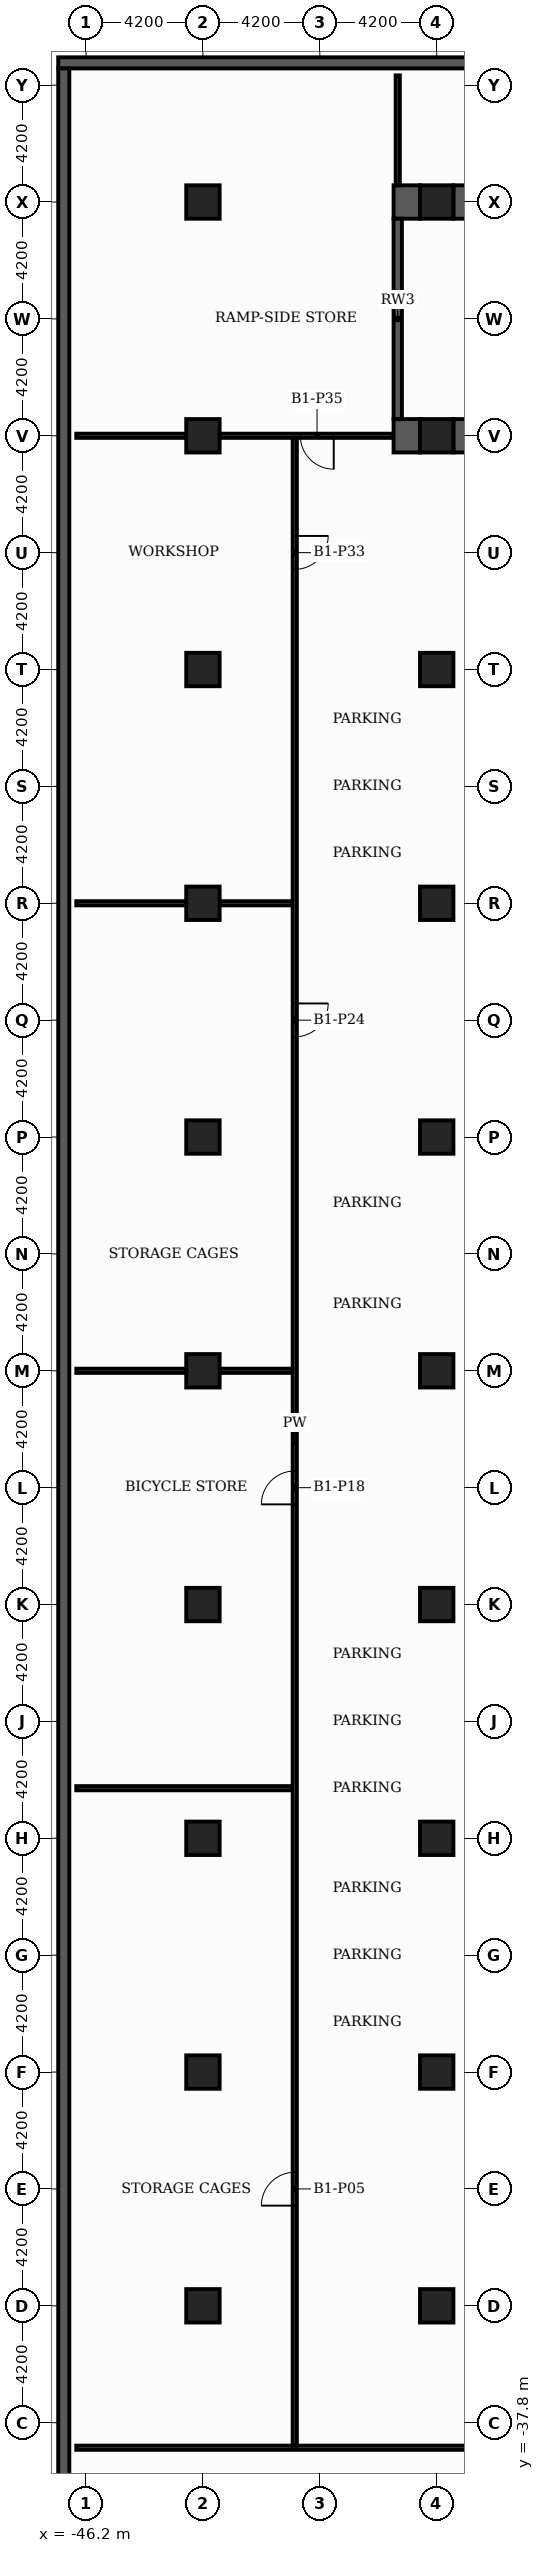
"""IFC4 building model, lengths in metres.
Left out: names, types, materials, properties, quantities, classifications, styles, units other than length and angle.
Written with IfcOpenShell. Run it as: python <this file> out.ifc"""

import sys

from ifc_helpers import new_model, si_unit, direction, frame, frame_2d, origin, origin_2d, place, context, subcontext, project, spatial, rectangle, extrude, element, fill, save


model = new_model("IFC4")
c1 = context("Model", 3, precision=1e-05, world=origin(), true_north=direction((0.0, 1.0)))
c2 = subcontext(c1, "Body", "Model", "MODEL_VIEW")
j1 = project(units=[si_unit("LENGTHUNIT", "METRE"), si_unit("PLANEANGLEUNIT", "RADIAN")], contexts=[c1])
p1 = place(None, origin())
s1 = spatial("IfcSite", under=j1, at=p1, CompositionType="ELEMENT")
p2 = place(p1, origin())
s2 = spatial("IfcBuilding", under=s1, at=p2, CompositionType="ELEMENT")
p3 = place(p2, frame((0.0, 0.0, -4.2)))
s3 = spatial("IfcBuildingStorey", under=s2, at=p3, CompositionType="ELEMENT", Elevation=-4.2)
p4 = place(p3, frame((-47.2, 47.0, 0.0), z_axis=(0.0, 0.0, 1.0), x_axis=(1.0, 0.0, 0.0)))
e1 = element("IfcWall", 1, at=p4, inside=s3, PredefinedType="USERDEFINED", context=c2, shape_type="SweptSolid", body=[
    extrude(rectangle(XDim=94.4, YDim=0.4, at=frame_2d((47.2, 0.0))), origin(), (0.0, 0.0, 1.0), 4.2),
])
p5 = place(p3, frame((-47.0, -46.8, 0.0), z_axis=(0.0, 0.0, 1.0), x_axis=(0.0, 1.0, 0.0)))
e2 = element("IfcWall", 2, at=p5, inside=s3, PredefinedType="USERDEFINED", context=c2, shape_type="SweptSolid", body=[
    extrude(rectangle(XDim=93.6, YDim=0.4, at=frame_2d((46.8, 0.0))), origin(), (0.0, 0.0, 1.0), 4.2),
])
for number, where, z_axis, x_axis in (
    (3, (-33.6, 0.0, 0.0), (0.0, 0.0, 1.0), (1.0, 0.0, 0.0)),
    (4, (-33.6, 8.4, 0.0), (0.0, 0.0, 1.0), (1.0, 0.0, 0.0)),
    (5, (-33.6, 16.8, 0.0), (0.0, 0.0, 1.0), (1.0, 0.0, 0.0)),
    (6, (-33.6, 25.2, 0.0), (0.0, 0.0, 1.0), (1.0, 0.0, 0.0)),
    (7, (-33.6, 33.6, 0.0), (0.0, 0.0, 1.0), (1.0, 0.0, 0.0)),
    (8, (-33.6, 42.0, 0.0), (0.0, 0.0, 1.0), (1.0, 0.0, 0.0)),
    (9, (-33.6, -8.4, 0.0), (0.0, 0.0, 1.0), (1.0, 0.0, 0.0)),
    (10, (-33.6, -16.8, 0.0), (0.0, 0.0, 1.0), (1.0, 0.0, 0.0)),
    (11, (-33.6, -25.2, 0.0), (0.0, 0.0, 1.0), (1.0, 0.0, 0.0)),
    (12, (-33.6, -33.6, 0.0), (0.0, 0.0, 1.0), (1.0, 0.0, 0.0)),
    (13, (-42.0, 0.0, 0.0), (0.0, 0.0, 1.0), (1.0, 0.0, 0.0)),
    (14, (-42.0, 8.4, 0.0), (0.0, 0.0, 1.0), (1.0, 0.0, 0.0)),
    (15, (-42.0, 16.8, 0.0), (0.0, 0.0, 1.0), (1.0, 0.0, 0.0)),
    (16, (-42.0, 25.2, 0.0), (0.0, 0.0, 1.0), (1.0, 0.0, 0.0)),
    (17, (-42.0, 33.6, 0.0), (0.0, 0.0, 1.0), (1.0, 0.0, 0.0)),
    (18, (-42.0, 42.0, 0.0), (0.0, 0.0, 1.0), (1.0, 0.0, 0.0)),
    (19, (-42.0, -8.4, 0.0), (0.0, 0.0, 1.0), (1.0, 0.0, 0.0)),
    (20, (-42.0, -16.8, 0.0), (0.0, 0.0, 1.0), (1.0, 0.0, 0.0)),
    (21, (-42.0, -25.2, 0.0), (0.0, 0.0, 1.0), (1.0, 0.0, 0.0)),
    (22, (-42.0, -33.6, 0.0), (0.0, 0.0, 1.0), (1.0, 0.0, 0.0)),
):
    element("IfcColumn", number, at=place(p3, frame(where, z_axis=z_axis, x_axis=x_axis)), inside=s3, PredefinedType="COLUMN", context=c2, shape_type="SweptSolid", body=[
        extrude(rectangle(XDim=1.2, YDim=1.2, at=origin_2d()), origin(), (0.0, 0.0, 1.0), 4.2),
    ])
p6 = place(p3, frame((-46.55, -38.7, 0.0), z_axis=(0.0, 0.0, 1.0), x_axis=(1.0, 0.0, 0.0)))
e23 = element("IfcWall", 23, at=p6, inside=s3, PredefinedType="PARTITIONING", context=c2, shape_type="SweptSolid", body=[
    extrude(rectangle(XDim=63.45, YDim=0.15, at=frame_2d((31.725, 0.0))), origin(), (0.0, 0.0, 1.0), 3.78),
])
p7 = place(p6, frame((16.55, 0.0, 0.0)))
e24 = element("IfcOpeningElement", 24, at=p7, cuts=e23, PredefinedType="OPENING", context=c2, shape_type="SweptSolid", body=[
    extrude(rectangle(XDim=1.2, YDim=2.2, at=frame_2d((0.6, 1.1))), frame((0.0, 0.085, 0.0), z_axis=(0.0, -1.0, 0.0), x_axis=(1.0, 0.0, 0.0)), (0.0, 0.0, 1.0), 0.17),
])
p8 = place(p6, frame((41.75, 0.0, 0.0)))
e25 = element("IfcOpeningElement", 25, at=p8, cuts=e23, PredefinedType="OPENING", context=c2, shape_type="SweptSolid", body=[
    extrude(rectangle(XDim=1.2, YDim=2.2, at=frame_2d((0.6, 1.1))), frame((0.0, 0.085, 0.0), z_axis=(0.0, -1.0, 0.0), x_axis=(1.0, 0.0, 0.0)), (0.0, 0.0, 1.0), 0.17),
])
p9 = place(p6, frame((58.55, 0.0, 0.0)))
e26 = element("IfcOpeningElement", 26, at=p9, cuts=e23, PredefinedType="OPENING", context=c2, shape_type="SweptSolid", body=[
    extrude(rectangle(XDim=1.2, YDim=2.2, at=frame_2d((0.6, 1.1))), frame((0.0, 0.085, 0.0), z_axis=(0.0, -1.0, 0.0), x_axis=(1.0, 0.0, 0.0)), (0.0, 0.0, 1.0), 0.17),
])
p10 = place(p3, frame((-46.55, -15.0, 0.0), z_axis=(0.0, 0.0, 1.0), x_axis=(1.0, 0.0, 0.0)))
e27 = element("IfcWall", 27, at=p10, inside=s3, PredefinedType="PARTITIONING", context=c2, shape_type="SweptSolid", body=[
    extrude(rectangle(XDim=7.775, YDim=0.15, at=frame_2d((3.888, 0.0))), origin(), (0.0, 0.0, 1.0), 3.78),
])
p11 = place(p3, frame((-46.55, 0.0, 0.0), z_axis=(0.0, 0.0, 1.0), x_axis=(1.0, 0.0, 0.0)))
e28 = element("IfcWall", 28, at=p11, inside=s3, PredefinedType="PARTITIONING", context=c2, shape_type="SweptSolid", body=[
    extrude(rectangle(XDim=3.95, YDim=0.15, at=frame_2d((1.975, 0.0))), origin(), (0.0, 0.0, 1.0), 3.78),
])
p12 = place(p3, frame((-41.4, 0.0, 0.0), z_axis=(0.0, 0.0, 1.0), x_axis=(1.0, 0.0, 0.0)))
e29 = element("IfcWall", 29, at=p12, inside=s3, PredefinedType="PARTITIONING", context=c2, shape_type="SweptSolid", body=[
    extrude(rectangle(XDim=2.625, YDim=0.15, at=frame_2d((1.312, 0.0))), origin(), (0.0, 0.0, 1.0), 3.78),
])
p13 = place(p3, frame((-46.55, 16.8, 0.0), z_axis=(0.0, 0.0, 1.0), x_axis=(1.0, 0.0, 0.0)))
e30 = element("IfcWall", 30, at=p13, inside=s3, PredefinedType="PARTITIONING", context=c2, shape_type="SweptSolid", body=[
    extrude(rectangle(XDim=3.95, YDim=0.15, at=frame_2d((1.975, 0.0))), origin(), (0.0, 0.0, 1.0), 3.78),
])
p14 = place(p3, frame((-41.4, 16.8, 0.0), z_axis=(0.0, 0.0, 1.0), x_axis=(1.0, 0.0, 0.0)))
e31 = element("IfcWall", 31, at=p14, inside=s3, PredefinedType="PARTITIONING", context=c2, shape_type="SweptSolid", body=[
    extrude(rectangle(XDim=2.625, YDim=0.15, at=frame_2d((1.312, 0.0))), origin(), (0.0, 0.0, 1.0), 3.78),
])
p15 = place(p3, frame((-46.55, 33.6, 0.0), z_axis=(0.0, 0.0, 1.0), x_axis=(1.0, 0.0, 0.0)))
e32 = element("IfcWall", 32, at=p15, inside=s3, PredefinedType="PARTITIONING", context=c2, shape_type="SweptSolid", body=[
    extrude(rectangle(XDim=3.95, YDim=0.15, at=frame_2d((1.975, 0.0))), origin(), (0.0, 0.0, 1.0), 3.78),
])
p16 = place(p3, frame((-41.4, 33.6, 0.0), z_axis=(0.0, 0.0, 1.0), x_axis=(1.0, 0.0, 0.0)))
e33 = element("IfcWall", 33, at=p16, inside=s3, PredefinedType="PARTITIONING", context=c2, shape_type="SweptSolid", body=[
    extrude(rectangle(XDim=6.25, YDim=0.15, at=frame_2d((3.125, 0.0))), origin(), (0.0, 0.0, 1.0), 3.78),
])
p17 = place(p16, frame((2.9, 0.0, 0.0)))
e34 = element("IfcOpeningElement", 34, at=p17, cuts=e33, PredefinedType="OPENING", context=c2, shape_type="SweptSolid", body=[
    extrude(rectangle(XDim=1.2, YDim=2.2, at=frame_2d((0.6, 1.1))), frame((0.0, 0.085, 0.0), z_axis=(0.0, -1.0, 0.0), x_axis=(1.0, 0.0, 0.0)), (0.0, 0.0, 1.0), 0.17),
])
p18 = place(p3, frame((-35.15, 33.6, 0.0), z_axis=(0.0, 0.0, 1.0), x_axis=(1.0, 0.0, 0.0)))
e35 = element("IfcWall", 35, at=p18, inside=s3, PredefinedType="SOLIDWALL", context=c2, shape_type="SweptSolid", body=[
    extrude(rectangle(XDim=0.95, YDim=1.2, at=frame_2d((0.475, 0.0))), origin(), (0.0, 0.0, 1.0), 3.78),
])
p19 = place(p3, frame((-33.0, 33.6, 0.0), z_axis=(0.0, 0.0, 1.0), x_axis=(1.0, 0.0, 0.0)))
e36 = element("IfcWall", 36, at=p19, inside=s3, PredefinedType="SOLIDWALL", context=c2, shape_type="SweptSolid", body=[
    extrude(rectangle(XDim=7.2, YDim=1.2, at=frame_2d((3.6, 0.0))), origin(), (0.0, 0.0, 1.0), 3.78),
])
p20 = place(p3, frame((-35.15, 42.0, 0.0), z_axis=(0.0, 0.0, 1.0), x_axis=(1.0, 0.0, 0.0)))
e37 = element("IfcWall", 37, at=p20, inside=s3, PredefinedType="SOLIDWALL", context=c2, shape_type="SweptSolid", body=[
    extrude(rectangle(XDim=0.95, YDim=1.2, at=frame_2d((0.475, 0.0))), origin(), (0.0, 0.0, 1.0), 3.78),
])
p21 = place(p3, frame((-33.0, 42.0, 0.0), z_axis=(0.0, 0.0, 1.0), x_axis=(1.0, 0.0, 0.0)))
e38 = element("IfcWall", 38, at=p21, inside=s3, PredefinedType="SOLIDWALL", context=c2, shape_type="SweptSolid", body=[
    extrude(rectangle(XDim=7.2, YDim=1.2, at=frame_2d((3.6, 0.0))), origin(), (0.0, 0.0, 1.0), 3.78),
])
p22 = place(p3, frame((-38.7, -38.625, 0.0), z_axis=(0.0, 0.0, 1.0), x_axis=(0.0, 1.0, 0.0)))
e39 = element("IfcWall", 39, at=p22, inside=s3, PredefinedType="PARTITIONING", context=c2, shape_type="SweptSolid", body=[
    extrude(rectangle(XDim=72.15, YDim=0.15, at=frame_2d((36.075, 0.0))), origin(), (0.0, 0.0, 1.0), 3.78),
])
p23 = place(p22, frame((8.625, 0.0, 0.0)))
e40 = element("IfcOpeningElement", 40, at=p23, cuts=e39, PredefinedType="OPENING", context=c2, shape_type="SweptSolid", body=[
    extrude(rectangle(XDim=1.2, YDim=2.2, at=frame_2d((0.6, 1.1))), frame((0.0, 0.085, 0.0), z_axis=(0.0, -1.0, 0.0), x_axis=(1.0, 0.0, 0.0)), (0.0, 0.0, 1.0), 0.17),
])
p24 = place(p22, frame((33.825, 0.0, 0.0)))
e41 = element("IfcOpeningElement", 41, at=p24, cuts=e39, PredefinedType="OPENING", context=c2, shape_type="SweptSolid", body=[
    extrude(rectangle(XDim=1.2, YDim=2.2, at=frame_2d((0.6, 1.1))), frame((0.0, 0.085, 0.0), z_axis=(0.0, -1.0, 0.0), x_axis=(1.0, 0.0, 0.0)), (0.0, 0.0, 1.0), 0.17),
])
p25 = place(p22, frame((50.625, 0.0, 0.0)))
e42 = element("IfcOpeningElement", 42, at=p25, cuts=e39, PredefinedType="OPENING", context=c2, shape_type="SweptSolid", body=[
    extrude(rectangle(XDim=1.2, YDim=2.2, at=frame_2d((0.6, 1.1))), frame((0.0, 0.085, 0.0), z_axis=(0.0, -1.0, 0.0), x_axis=(1.0, 0.0, 0.0)), (0.0, 0.0, 1.0), 0.17),
])
p26 = place(p22, frame((67.425, 0.0, 0.0)))
e43 = element("IfcOpeningElement", 43, at=p26, cuts=e39, PredefinedType="OPENING", context=c2, shape_type="SweptSolid", body=[
    extrude(rectangle(XDim=1.2, YDim=2.2, at=frame_2d((0.6, 1.1))), frame((0.0, 0.085, 0.0), z_axis=(0.0, -1.0, 0.0), x_axis=(1.0, 0.0, 0.0)), (0.0, 0.0, 1.0), 0.17),
])
p27 = place(p3, frame((-35.0, 34.2, 0.0), z_axis=(0.0, 0.0, 1.0), x_axis=(0.0, 1.0, 0.0)))
e44 = element("IfcWall", 44, at=p27, inside=s3, PredefinedType="SOLIDWALL", context=c2, shape_type="SweptSolid", body=[
    extrude(rectangle(XDim=7.2, YDim=0.3, at=frame_2d((3.6, 0.0))), origin(), (0.0, 0.0, 1.0), 3.78),
])
p28 = place(p3, frame((-35.0, 42.6, 0.0), z_axis=(0.0, 0.0, 1.0), x_axis=(0.0, 1.0, 0.0)))
e45 = element("IfcWall", 45, at=p28, inside=s3, PredefinedType="PARTITIONING", context=c2, shape_type="SweptSolid", body=[
    extrude(rectangle(XDim=3.95, YDim=0.15, at=frame_2d((1.975, 0.0))), origin(), (0.0, 0.0, 1.0), 3.78),
])
p29 = place(p23, origin())
e46 = element("IfcDoor", 46, at=p29, inside=s3, OperationType="SINGLE_SWING_LEFT", PredefinedType="DOOR", context=c2, shape_type="SweptSolid", body=[
    extrude(rectangle(XDim=1.2, YDim=2.2, at=frame_2d((0.6, 1.1))), frame((0.0, 0.025, 0.0), z_axis=(0.0, -1.0, 0.0), x_axis=(1.0, 0.0, 0.0)), (0.0, 0.0, 1.0), 0.05),
])
fill(e40, e46)
p30 = place(p24, origin())
e47 = element("IfcDoor", 47, at=p30, inside=s3, OperationType="SINGLE_SWING_LEFT", PredefinedType="DOOR", context=c2, shape_type="SweptSolid", body=[
    extrude(rectangle(XDim=1.2, YDim=2.2, at=frame_2d((0.6, 1.1))), frame((0.0, 0.025, 0.0), z_axis=(0.0, -1.0, 0.0), x_axis=(1.0, 0.0, 0.0)), (0.0, 0.0, 1.0), 0.05),
])
fill(e41, e47)
p31 = place(p25, origin())
e48 = element("IfcDoor", 48, at=p31, inside=s3, OperationType="SINGLE_SWING_RIGHT", PredefinedType="DOOR", context=c2, shape_type="SweptSolid", body=[
    extrude(rectangle(XDim=1.2, YDim=2.2, at=frame_2d((0.6, 1.1))), frame((0.0, 0.025, 0.0), z_axis=(0.0, -1.0, 0.0), x_axis=(1.0, 0.0, 0.0)), (0.0, 0.0, 1.0), 0.05),
])
fill(e42, e48)
p32 = place(p26, origin())
e49 = element("IfcDoor", 49, at=p32, inside=s3, OperationType="SINGLE_SWING_RIGHT", PredefinedType="DOOR", context=c2, shape_type="SweptSolid", body=[
    extrude(rectangle(XDim=1.2, YDim=2.2, at=frame_2d((0.6, 1.1))), frame((0.0, 0.025, 0.0), z_axis=(0.0, -1.0, 0.0), x_axis=(1.0, 0.0, 0.0)), (0.0, 0.0, 1.0), 0.05),
])
fill(e43, e49)
p33 = place(p17, origin())
e50 = element("IfcDoor", 50, at=p33, inside=s3, OperationType="SINGLE_SWING_RIGHT", PredefinedType="DOOR", context=c2, shape_type="SweptSolid", body=[
    extrude(rectangle(XDim=1.2, YDim=2.2, at=frame_2d((0.6, 1.1))), frame((0.0, 0.025, 0.0), z_axis=(0.0, -1.0, 0.0), x_axis=(1.0, 0.0, 0.0)), (0.0, 0.0, 1.0), 0.05),
])
fill(e34, e50)
save(model, sys.argv[1])
